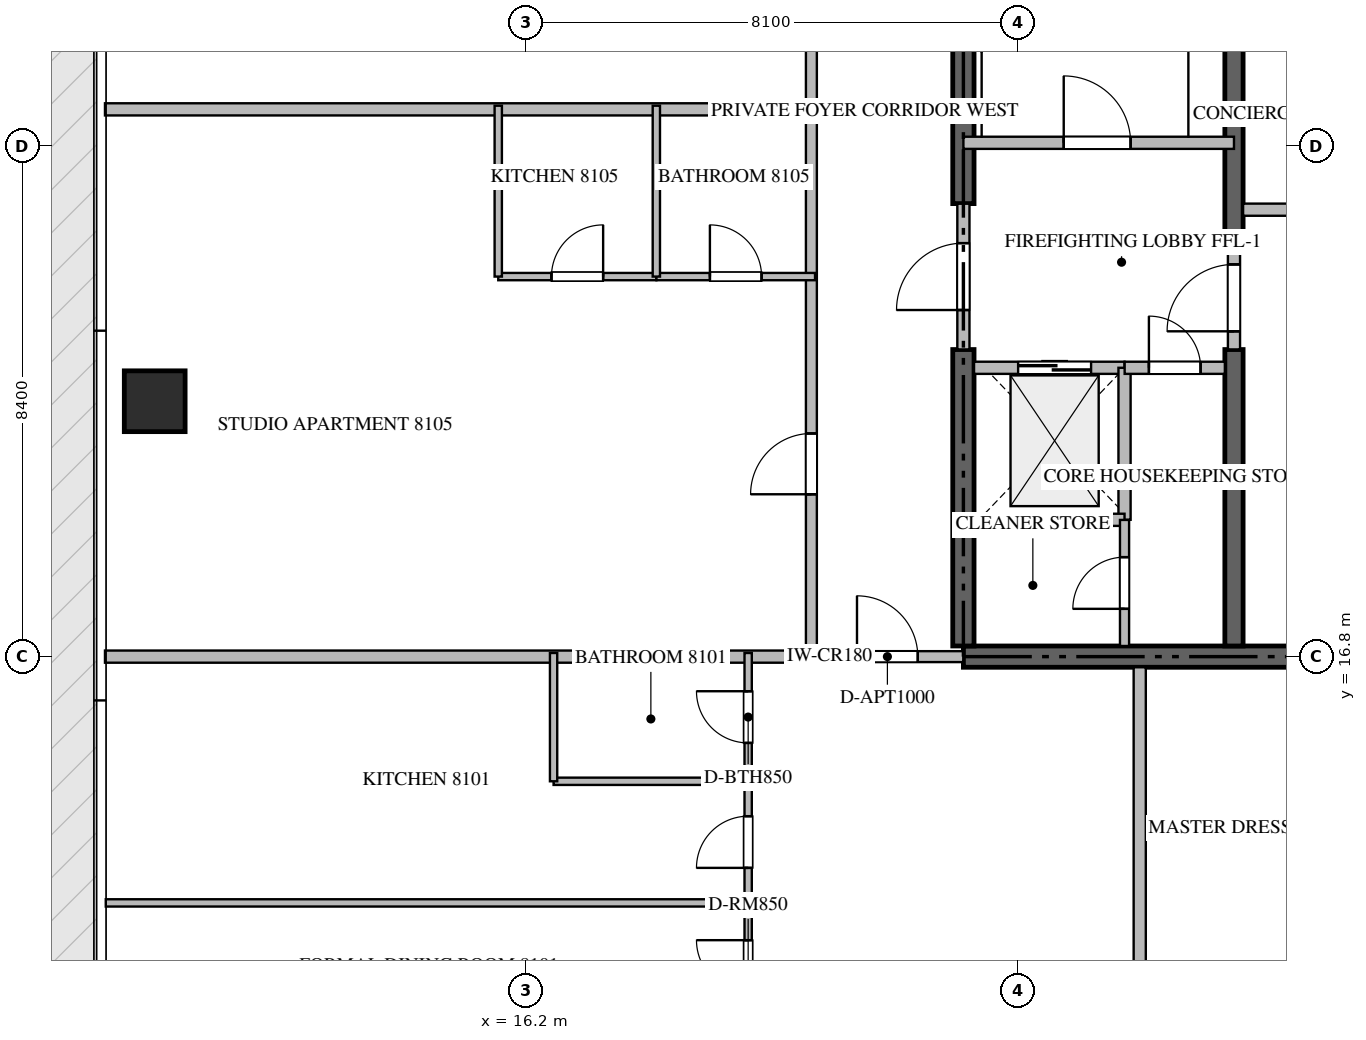
"""IFC4 building model, lengths in metres.
Left out: names, types, materials, properties, quantities, classifications, styles, units other than length and angle.
Written with IfcOpenShell. Run it as: python <this file> out.ifc"""

import sys

from ifc_helpers import new_model, si_unit, direction, frame, frame_2d, origin, origin_2d, place, context, subcontext, project, spatial, rectangle, extrude, source, transform, mapped, element, fill, save


model = new_model("IFC4")
c1 = context("Model", 3, precision=1e-05, world=origin(), true_north=direction((0.0, 1.0)))
c2 = subcontext(c1, "Body", "Model", "MODEL_VIEW")
j1 = project(units=[si_unit("LENGTHUNIT", "METRE"), si_unit("PLANEANGLEUNIT", "RADIAN")], contexts=[c1])
p1 = place(None, origin())
s1 = spatial("IfcSite", under=j1, at=p1, CompositionType="ELEMENT")
p2 = place(p1, origin())
s2 = spatial("IfcBuilding", under=s1, at=p2, CompositionType="ELEMENT")
p3 = place(p2, frame((0.0, 0.0, 325.85)))
s3 = spatial("IfcBuildingStorey", under=s2, at=p3, CompositionType="ELEMENT", Elevation=325.85)
p4 = place(p3, frame((23.4, 16.8, -0.26), z_axis=(0.0, 0.0, 1.0), x_axis=(1.0, 0.0, 0.0)))
e1 = element("IfcWall", 1, at=p4, inside=s3, PredefinedType="SHEAR", context=c2, shape_type="SweptSolid", body=[
    extrude(rectangle(XDim=18.0, YDim=0.35, at=frame_2d((9.0, 0.0))), origin(), (0.0, 0.0, 1.0), 4.048),
])
p5 = place(p3, frame((23.4, 16.975, -0.26), z_axis=(0.0, 0.0, 1.0), x_axis=(0.0, 1.0, 0.0)))
e2 = element("IfcWall", 2, at=p5, inside=s3, PredefinedType="SHEAR", context=c2, shape_type="SweptSolid", body=[
    extrude(rectangle(XDim=4.875, YDim=0.35, at=frame_2d((2.438, 0.0))), origin(), (0.0, 0.0, 1.0), 4.048),
])
p6 = place(p3, frame((23.4, 24.25, -0.26), z_axis=(0.0, 0.0, 1.0), x_axis=(0.0, 1.0, 0.0)))
e3 = element("IfcWall", 3, at=p6, inside=s3, PredefinedType="SHEAR", context=c2, shape_type="SweptSolid", body=[
    extrude(rectangle(XDim=9.175, YDim=0.35, at=frame_2d((4.587, 0.0))), origin(), (0.0, 0.0, 1.0), 4.048),
])
p7 = place(p3, frame((27.85, 16.975, -0.26), z_axis=(0.0, 0.0, 1.0), x_axis=(0.0, 1.0, 0.0)))
e4 = element("IfcWall", 4, at=p7, inside=s3, PredefinedType="SHEAR", context=c2, shape_type="SweptSolid", body=[
    extrude(rectangle(XDim=4.875, YDim=0.3, at=frame_2d((2.438, 0.0))), origin(), (0.0, 0.0, 1.0), 4.048),
])
p8 = place(p3, frame((27.85, 23.55, -0.26), z_axis=(0.0, 0.0, 1.0), x_axis=(0.0, 1.0, 0.0)))
e5 = element("IfcWall", 5, at=p8, inside=s3, PredefinedType="SHEAR", context=c2, shape_type="SweptSolid", body=[
    extrude(rectangle(XDim=9.875, YDim=0.3, at=frame_2d((4.938, 0.0))), origin(), (0.0, 0.0, 1.0), 4.048),
])
m1 = source(origin(), c2, "Body", "SweptSolid", [
    extrude(rectangle(XDim=1.0, YDim=1.0, at=origin_2d()), origin(), (0.0, 0.0, 1.0), 4.05),
])
p9 = place(p3, frame((10.1, 21.0, -0.26), z_axis=(0.0, 0.0, 1.0), x_axis=(1.0, 0.0, 0.0)))
e6 = element("IfcColumn", 6, at=p9, inside=s3, PredefinedType="COLUMN", context=c2, shape_type="MappedRepresentation", body=[
    mapped(m1, transform((0.0, 0.0, 0.0), scale=1.0)),
])
p10 = place(p3, frame((23.4, 25.25, 0.0), z_axis=(0.0, 0.0, 1.0), x_axis=(1.0, 0.0, 0.0)))
e7 = element("IfcWall", 7, at=p10, inside=s3, PredefinedType="STANDARD", context=c2, shape_type="SweptSolid", body=[
    extrude(rectangle(XDim=4.45, YDim=0.2, at=frame_2d((2.225, 0.0))), origin(), (0.0, 0.0, 1.0), 3.79),
])
p11 = place(p10, frame((1.65, 0.0, 0.0)))
e8 = element("IfcOpeningElement", 8, at=p11, cuts=e7, PredefinedType="OPENING", context=c2, shape_type="SweptSolid", body=[
    extrude(rectangle(XDim=1.1, YDim=2.15, at=frame_2d((0.55, 1.075))), frame((0.0, 0.11, 0.0), z_axis=(0.0, -1.0, 0.0), x_axis=(1.0, 0.0, 0.0)), (0.0, 0.0, 1.0), 0.22),
])
p12 = place(p3, frame((23.575, 21.55, 0.0), z_axis=(0.0, 0.0, 1.0), x_axis=(1.0, 0.0, 0.0)))
e9 = element("IfcWall", 9, at=p12, inside=s3, PredefinedType="STANDARD", context=c2, shape_type="SweptSolid", body=[
    extrude(rectangle(XDim=2.475, YDim=0.2, at=frame_2d((1.238, 0.0))), origin(), (0.0, 0.0, 1.0), 3.79),
])
p13 = place(p12, frame((0.725, 0.0, 0.0)))
e10 = element("IfcOpeningElement", 10, at=p13, cuts=e9, PredefinedType="OPENING", context=c2, shape_type="SweptSolid", body=[
    extrude(rectangle(XDim=1.2, YDim=2.2, at=frame_2d((0.6, 1.1))), frame((0.0, 0.11, 0.0), z_axis=(0.0, -1.0, 0.0), x_axis=(1.0, 0.0, 0.0)), (0.0, 0.0, 1.0), 0.22),
])
p14 = place(p3, frame((26.05, 19.05, 0.0), z_axis=(0.0, 0.0, 1.0), x_axis=(0.0, 1.0, 0.0)))
e11 = element("IfcWall", 11, at=p14, inside=s3, PredefinedType="STANDARD", context=c2, shape_type="SweptSolid", body=[
    extrude(rectangle(XDim=2.5, YDim=0.2, at=frame_2d((1.25, 0.0))), origin(), (0.0, 0.0, 1.0), 3.79),
])
p15 = place(p3, frame((23.575, 19.05, 0.0), z_axis=(0.0, 0.0, 1.0), x_axis=(1.0, 0.0, 0.0)))
e12 = element("IfcWall", 12, at=p15, inside=s3, PredefinedType="STANDARD", context=c2, shape_type="SweptSolid", body=[
    extrude(rectangle(XDim=2.475, YDim=0.2, at=frame_2d((1.238, 0.0))), origin(), (0.0, 0.0, 1.0), 3.79),
])
p16 = place(p3, frame((26.052, 21.55, 0.0), z_axis=(0.0, 0.0, 1.0), x_axis=(1.0, 0.0, 0.0)))
e13 = element("IfcWall", 13, at=p16, inside=s3, PredefinedType="STANDARD", context=c2, shape_type="SweptSolid", body=[
    extrude(rectangle(XDim=1.648, YDim=0.2, at=frame_2d((0.824, 0.0))), origin(), (0.0, 0.0, 1.0), 3.79),
])
p17 = place(p16, frame((0.399, 0.0, 0.0)))
e14 = element("IfcOpeningElement", 14, at=p17, cuts=e13, PredefinedType="OPENING", context=c2, shape_type="SweptSolid", body=[
    extrude(rectangle(XDim=0.85, YDim=2.1, at=frame_2d((0.425, 1.05))), frame((0.0, 0.11, 0.0), z_axis=(0.0, -1.0, 0.0), x_axis=(1.0, 0.0, 0.0)), (0.0, 0.0, 1.0), 0.22),
])
p18 = place(p3, frame((23.4, 21.852, 0.0), z_axis=(0.0, 0.0, 1.0), x_axis=(0.0, 1.0, 0.0)))
e15 = element("IfcWall", 15, at=p18, inside=s3, PredefinedType="STANDARD", context=c2, shape_type="SweptSolid", body=[
    extrude(rectangle(XDim=2.396, YDim=0.2, at=frame_2d((1.198, 0.0))), origin(), (0.0, 0.0, 1.0), 3.79),
])
p19 = place(p18, frame((0.648, 0.0, 0.0)))
e16 = element("IfcOpeningElement", 16, at=p19, cuts=e15, PredefinedType="OPENING", context=c2, shape_type="SweptSolid", body=[
    extrude(rectangle(XDim=1.1, YDim=2.15, at=frame_2d((0.55, 1.075))), frame((0.0, 0.11, 0.0), z_axis=(0.0, -1.0, 0.0), x_axis=(1.0, 0.0, 0.0)), (0.0, 0.0, 1.0), 0.22),
])
p20 = place(p3, frame((27.85, 21.852, 0.0), z_axis=(0.0, 0.0, 1.0), x_axis=(0.0, 1.0, 0.0)))
e17 = element("IfcWall", 17, at=p20, inside=s3, PredefinedType="STANDARD", context=c2, shape_type="SweptSolid", body=[
    extrude(rectangle(XDim=1.696, YDim=0.2, at=frame_2d((0.848, 0.0))), origin(), (0.0, 0.0, 1.0), 3.79),
])
p21 = place(p20, frame((0.298, 0.0, 0.0)))
e18 = element("IfcOpeningElement", 18, at=p21, cuts=e17, PredefinedType="OPENING", context=c2, shape_type="SweptSolid", body=[
    extrude(rectangle(XDim=1.1, YDim=2.15, at=frame_2d((0.55, 1.075))), frame((0.0, 0.11, 0.0), z_axis=(0.0, -1.0, 0.0), x_axis=(1.0, 0.0, 0.0)), (0.0, 0.0, 1.0), 0.22),
])
p22 = place(p3, frame((26.05, 16.975, 0.0), z_axis=(0.0, 0.0, 1.0), x_axis=(0.0, 1.0, 0.0)))
e19 = element("IfcWall", 19, at=p22, inside=s3, PredefinedType="PARTITIONING", context=c2, shape_type="SweptSolid", body=[
    extrude(rectangle(XDim=2.073, YDim=0.15, at=frame_2d((1.037, 0.0))), origin(), (0.0, 0.0, 1.0), 3.79),
])
p23 = place(p22, frame((0.611, 0.0, 0.0)))
e20 = element("IfcOpeningElement", 20, at=p23, cuts=e19, PredefinedType="OPENING", context=c2, shape_type="SweptSolid", body=[
    extrude(rectangle(XDim=0.85, YDim=2.1, at=frame_2d((0.425, 1.05))), frame((0.0, 0.085, 0.0), z_axis=(0.0, -1.0, 0.0), x_axis=(1.0, 0.0, 0.0)), (0.0, 0.0, 1.0), 0.17),
])
p24 = place(p3, frame((28.0, 19.75, 0.0), z_axis=(0.0, 0.0, 1.0), x_axis=(1.0, 0.0, 0.0)))
e21 = element("IfcWall", 21, at=p24, inside=s3, PredefinedType="STANDARD", context=c2, shape_type="SweptSolid", body=[
    extrude(rectangle(XDim=8.8, YDim=0.2, at=frame_2d((4.4, 0.0))), origin(), (0.0, 0.0, 1.0), 3.79),
])
p25 = place(p24, frame((3.95, 0.0, 0.0)))
e22 = element("IfcOpeningElement", 22, at=p25, cuts=e21, PredefinedType="OPENING", context=c2, shape_type="SweptSolid", body=[
    extrude(rectangle(XDim=0.9, YDim=2.1, at=frame_2d((0.45, 1.05))), frame((0.0, 0.11, 0.0), z_axis=(0.0, -1.0, 0.0), x_axis=(1.0, 0.0, 0.0)), (0.0, 0.0, 1.0), 0.22),
])
p26 = place(p3, frame((28.0, 24.15, 0.0), z_axis=(0.0, 0.0, 1.0), x_axis=(1.0, 0.0, 0.0)))
e23 = element("IfcWall", 23, at=p26, inside=s3, PredefinedType="STANDARD", context=c2, shape_type="SweptSolid", body=[
    extrude(rectangle(XDim=3.45, YDim=0.2, at=frame_2d((1.725, 0.0))), origin(), (0.0, 0.0, 1.0), 3.79),
])
p27 = place(p26, frame((1.3, 0.0, 0.0)))
e24 = element("IfcOpeningElement", 24, at=p27, cuts=e23, PredefinedType="OPENING", context=c2, shape_type="SweptSolid", body=[
    extrude(rectangle(XDim=0.85, YDim=2.1, at=frame_2d((0.425, 1.05))), frame((0.0, 0.11, 0.0), z_axis=(0.0, -1.0, 0.0), x_axis=(1.0, 0.0, 0.0)), (0.0, 0.0, 1.0), 0.22),
])
p28 = place(p3, frame((26.3, 2.482, 0.0), z_axis=(0.0, 0.0, 1.0), x_axis=(0.0, 1.0, 0.0)))
e25 = element("IfcWall", 25, at=p28, inside=s3, PredefinedType="PARTITIONING", context=c2, shape_type="SweptSolid", body=[
    extrude(rectangle(XDim=14.143, YDim=0.2, at=frame_2d((7.072, 0.0))), origin(), (0.0, 0.0, 1.0), 3.79),
])
p29 = place(p3, frame((9.282, 25.8, 0.0), z_axis=(0.0, 0.0, 1.0), x_axis=(1.0, 0.0, 0.0)))
e26 = element("IfcWall", 26, at=p29, inside=s3, PredefinedType="PARTITIONING", context=c2, shape_type="SweptSolid", body=[
    extrude(rectangle(XDim=11.738, YDim=0.2, at=frame_2d((5.869, 0.0))), origin(), (0.0, 0.0, 1.0), 3.79),
])
p30 = place(p3, frame((9.282, 16.8, 0.0), z_axis=(0.0, 0.0, 1.0), x_axis=(1.0, 0.0, 0.0)))
e27 = element("IfcWall", 27, at=p30, inside=s3, PredefinedType="PARTITIONING", context=c2, shape_type="SweptSolid", body=[
    extrude(rectangle(XDim=11.618, YDim=0.2, at=frame_2d((5.809, 0.0))), origin(), (0.0, 0.0, 1.0), 3.79),
])
p31 = place(p3, frame((20.902, 16.8, 0.0), z_axis=(0.0, 0.0, 1.0), x_axis=(1.0, 0.0, 0.0)))
e28 = element("IfcWall", 28, at=p31, inside=s3, PredefinedType="PARTITIONING", context=c2, shape_type="SweptSolid", body=[
    extrude(rectangle(XDim=2.496, YDim=0.18, at=frame_2d((1.248, 0.0))), origin(), (0.0, 0.0, 1.0), 3.79),
])
p32 = place(p31, frame((0.748, 0.0, 0.0)))
e29 = element("IfcOpeningElement", 29, at=p32, cuts=e28, PredefinedType="OPENING", context=c2, shape_type="SweptSolid", body=[
    extrude(rectangle(XDim=1.0, YDim=2.15, at=frame_2d((0.5, 1.075))), frame((0.0, 0.1, 0.0), z_axis=(0.0, -1.0, 0.0), x_axis=(1.0, 0.0, 0.0)), (0.0, 0.0, 1.0), 0.2),
])
p33 = place(p3, frame((20.9, 16.8, 0.0), z_axis=(0.0, 0.0, 1.0), x_axis=(0.0, 1.0, 0.0)))
e30 = element("IfcWall", 30, at=p33, inside=s3, PredefinedType="PARTITIONING", context=c2, shape_type="SweptSolid", body=[
    extrude(rectangle(XDim=16.8, YDim=0.18, at=frame_2d((8.4, 0.0))), origin(), (0.0, 0.0, 1.0), 3.79),
])
p34 = place(p33, frame((2.67, 0.0, 0.0)))
e31 = element("IfcOpeningElement", 31, at=p34, cuts=e30, PredefinedType="OPENING", context=c2, shape_type="SweptSolid", body=[
    extrude(rectangle(XDim=1.0, YDim=2.15, at=frame_2d((0.5, 1.075))), frame((0.0, 0.1, 0.0), z_axis=(0.0, -1.0, 0.0), x_axis=(1.0, 0.0, 0.0)), (0.0, 0.0, 1.0), 0.2),
])
p35 = place(p33, frame((11.107, 0.0, 0.0)))
e32 = element("IfcOpeningElement", 32, at=p35, cuts=e30, PredefinedType="OPENING", context=c2, shape_type="SweptSolid", body=[
    extrude(rectangle(XDim=1.0, YDim=2.15, at=frame_2d((0.5, 1.075))), frame((0.0, 0.1, 0.0), z_axis=(0.0, -1.0, 0.0), x_axis=(1.0, 0.0, 0.0)), (0.0, 0.0, 1.0), 0.2),
])
p36 = place(p3, frame((9.295, 12.75, 0.0), z_axis=(0.0, 0.0, 1.0), x_axis=(1.0, 0.0, 0.0)))
e33 = element("IfcWall", 33, at=p36, inside=s3, PredefinedType="PARTITIONING", context=c2, shape_type="SweptSolid", body=[
    extrude(rectangle(XDim=10.565, YDim=0.12, at=frame_2d((5.283, 0.0))), origin(), (0.0, 0.0, 1.0), 3.79),
])
p37 = place(p3, frame((16.66, 14.75, 0.0), z_axis=(0.0, 0.0, 1.0), x_axis=(1.0, 0.0, 0.0)))
e34 = element("IfcWall", 34, at=p37, inside=s3, PredefinedType="PARTITIONING", context=c2, shape_type="SweptSolid", body=[
    extrude(rectangle(XDim=3.2, YDim=0.12, at=frame_2d((1.6, 0.0))), origin(), (0.0, 0.0, 1.0), 3.79),
])
p38 = place(p3, frame((16.66, 14.75, 0.0), z_axis=(0.0, 0.0, 1.0), x_axis=(0.0, 1.0, 0.0)))
e35 = element("IfcWall", 35, at=p38, inside=s3, PredefinedType="PARTITIONING", context=c2, shape_type="SweptSolid", body=[
    extrude(rectangle(XDim=2.11, YDim=0.12, at=frame_2d((1.055, 0.0))), origin(), (0.0, 0.0, 1.0), 3.79),
])
p39 = place(p3, frame((19.86, 10.674, 0.0), z_axis=(0.0, 0.0, 1.0), x_axis=(0.0, 1.0, 0.0)))
e36 = element("IfcWall", 36, at=p39, inside=s3, PredefinedType="PARTITIONING", context=c2, shape_type="SweptSolid", body=[
    extrude(rectangle(XDim=2.076, YDim=0.12, at=frame_2d((1.038, 0.0))), origin(), (0.0, 0.0, 1.0), 3.79),
])
p40 = place(p39, frame((0.613, 0.0, 0.0)))
e37 = element("IfcOpeningElement", 37, at=p40, cuts=e36, PredefinedType="OPENING", context=c2, shape_type="SweptSolid", body=[
    extrude(rectangle(XDim=0.85, YDim=2.1, at=frame_2d((0.425, 1.05))), frame((0.0, 0.07, 0.0), z_axis=(0.0, -1.0, 0.0), x_axis=(1.0, 0.0, 0.0)), (0.0, 0.0, 1.0), 0.14),
])
p41 = place(p3, frame((19.86, 12.752, 0.0), z_axis=(0.0, 0.0, 1.0), x_axis=(0.0, 1.0, 0.0)))
e38 = element("IfcWall", 38, at=p41, inside=s3, PredefinedType="PARTITIONING", context=c2, shape_type="SweptSolid", body=[
    extrude(rectangle(XDim=1.998, YDim=0.12, at=frame_2d((0.999, 0.0))), origin(), (0.0, 0.0, 1.0), 3.79),
])
p42 = place(p41, frame((0.574, 0.0, 0.0)))
e39 = element("IfcOpeningElement", 39, at=p42, cuts=e38, PredefinedType="OPENING", context=c2, shape_type="SweptSolid", body=[
    extrude(rectangle(XDim=0.85, YDim=2.1, at=frame_2d((0.425, 1.05))), frame((0.0, 0.07, 0.0), z_axis=(0.0, -1.0, 0.0), x_axis=(1.0, 0.0, 0.0)), (0.0, 0.0, 1.0), 0.14),
])
p43 = place(p3, frame((19.86, 14.752, 0.0), z_axis=(0.0, 0.0, 1.0), x_axis=(0.0, 1.0, 0.0)))
e40 = element("IfcWall", 40, at=p43, inside=s3, PredefinedType="PARTITIONING", context=c2, shape_type="SweptSolid", body=[
    extrude(rectangle(XDim=2.108, YDim=0.12, at=frame_2d((1.054, 0.0))), origin(), (0.0, 0.0, 1.0), 3.79),
])
p44 = place(p43, frame((0.629, 0.0, 0.0)))
e41 = element("IfcOpeningElement", 41, at=p44, cuts=e40, PredefinedType="OPENING", context=c2, shape_type="SweptSolid", body=[
    extrude(rectangle(XDim=0.85, YDim=2.1, at=frame_2d((0.425, 1.05))), frame((0.0, 0.07, 0.0), z_axis=(0.0, -1.0, 0.0), x_axis=(1.0, 0.0, 0.0)), (0.0, 0.0, 1.0), 0.14),
])
p45 = place(p3, frame((15.75, 23.05, 0.0), z_axis=(0.0, 0.0, 1.0), x_axis=(1.0, 0.0, 0.0)))
e42 = element("IfcWall", 42, at=p45, inside=s3, PredefinedType="PARTITIONING", context=c2, shape_type="SweptSolid", body=[
    extrude(rectangle(XDim=2.6, YDim=0.12, at=frame_2d((1.3, 0.0))), origin(), (0.0, 0.0, 1.0), 3.79),
])
p46 = place(p45, frame((0.875, 0.0, 0.0)))
e43 = element("IfcOpeningElement", 43, at=p46, cuts=e42, PredefinedType="OPENING", context=c2, shape_type="SweptSolid", body=[
    extrude(rectangle(XDim=0.85, YDim=2.1, at=frame_2d((0.425, 1.05))), frame((0.0, 0.07, 0.0), z_axis=(0.0, -1.0, 0.0), x_axis=(1.0, 0.0, 0.0)), (0.0, 0.0, 1.0), 0.14),
])
p47 = place(p3, frame((18.352, 23.05, 0.0), z_axis=(0.0, 0.0, 1.0), x_axis=(1.0, 0.0, 0.0)))
e44 = element("IfcWall", 44, at=p47, inside=s3, PredefinedType="PARTITIONING", context=c2, shape_type="SweptSolid", body=[
    extrude(rectangle(XDim=2.608, YDim=0.12, at=frame_2d((1.304, 0.0))), origin(), (0.0, 0.0, 1.0), 3.79),
])
p48 = place(p47, frame((0.879, 0.0, 0.0)))
e45 = element("IfcOpeningElement", 45, at=p48, cuts=e44, PredefinedType="OPENING", context=c2, shape_type="SweptSolid", body=[
    extrude(rectangle(XDim=0.85, YDim=2.1, at=frame_2d((0.425, 1.05))), frame((0.0, 0.07, 0.0), z_axis=(0.0, -1.0, 0.0), x_axis=(1.0, 0.0, 0.0)), (0.0, 0.0, 1.0), 0.14),
])
for number, where, z_axis, x_axis in (
    (46, (18.35, 23.05, 0.0), (0.0, 0.0, 1.0), (0.0, 1.0, 0.0)),
    (47, (15.75, 23.05, 0.0), (0.0, 0.0, 1.0), (0.0, 1.0, 0.0)),
):
    element("IfcWall", number, at=place(p3, frame(where, z_axis=z_axis, x_axis=x_axis)), inside=s3, PredefinedType="PARTITIONING", context=c2, shape_type="SweptSolid", body=[
        extrude(rectangle(XDim=2.81, YDim=0.12, at=frame_2d((1.405, 0.0))), origin(), (0.0, 0.0, 1.0), 3.79),
    ])
m2 = source(origin(), c2, "Body", "SweptSolid", [
    extrude(rectangle(XDim=1.1, YDim=2.15, at=frame_2d((0.55, 1.075))), frame((0.0, 0.025, 0.0), z_axis=(0.0, -1.0, 0.0), x_axis=(1.0, 0.0, 0.0)), (0.0, 0.0, 1.0), 0.05),
])
p49 = place(p11, origin())
e48 = element("IfcDoor", 48, at=p49, inside=s3, OperationType="SINGLE_SWING_LEFT", PredefinedType="DOOR", context=c2, shape_type="MappedRepresentation", body=[
    mapped(m2, transform((0.0, 0.0, 0.0), scale=1.0)),
])
fill(e8, e48)
m3 = source(origin(), c2, "Body", "SweptSolid", [
    extrude(rectangle(XDim=1.2, YDim=2.2, at=frame_2d((0.6, 1.1))), frame((0.0, 0.025, 0.0), z_axis=(0.0, -1.0, 0.0), x_axis=(1.0, 0.0, 0.0)), (0.0, 0.0, 1.0), 0.05),
])
p50 = place(p13, origin())
e49 = element("IfcDoor", 49, at=p50, inside=s3, OperationType="DOUBLE_DOOR_SLIDING", PredefinedType="DOOR", context=c2, shape_type="MappedRepresentation", body=[
    mapped(m3, transform((0.0, 0.0, 0.0), scale=1.0)),
])
fill(e10, e49)
m4 = source(origin(), c2, "Body", "SweptSolid", [
    extrude(rectangle(XDim=0.85, YDim=2.1, at=frame_2d((0.425, 1.05))), frame((0.0, 0.025, 0.0), z_axis=(0.0, -1.0, 0.0), x_axis=(1.0, 0.0, 0.0)), (0.0, 0.0, 1.0), 0.05),
])
p51 = place(p17, origin())
e50 = element("IfcDoor", 50, at=p51, inside=s3, OperationType="SINGLE_SWING_LEFT", PredefinedType="DOOR", context=c2, shape_type="MappedRepresentation", body=[
    mapped(m4, transform((0.0, 0.0, 0.0), scale=1.0)),
])
fill(e14, e50)
p52 = place(p19, origin())
e51 = element("IfcDoor", 51, at=p52, inside=s3, OperationType="SINGLE_SWING_LEFT", PredefinedType="DOOR", context=c2, shape_type="MappedRepresentation", body=[
    mapped(m2, transform((0.0, 0.0, 0.0), scale=1.0)),
])
fill(e16, e51)
p53 = place(p21, origin())
e52 = element("IfcDoor", 52, at=p53, inside=s3, OperationType="SINGLE_SWING_LEFT", PredefinedType="DOOR", context=c2, shape_type="MappedRepresentation", body=[
    mapped(m2, transform((0.0, 0.0, 0.0), scale=1.0)),
])
fill(e18, e52)
p54 = place(p23, origin())
e53 = element("IfcDoor", 53, at=p54, inside=s3, OperationType="SINGLE_SWING_LEFT", PredefinedType="DOOR", context=c2, shape_type="MappedRepresentation", body=[
    mapped(m4, transform((0.0, 0.0, 0.0), scale=1.0)),
])
fill(e20, e53)
m5 = source(origin(), c2, "Body", "SweptSolid", [
    extrude(rectangle(XDim=1.0, YDim=2.15, at=frame_2d((0.5, 1.075))), frame((0.0, 0.025, 0.0), z_axis=(0.0, -1.0, 0.0), x_axis=(1.0, 0.0, 0.0)), (0.0, 0.0, 1.0), 0.05),
])
p55 = place(p32, origin())
e54 = element("IfcDoor", 54, at=p55, inside=s3, OperationType="SINGLE_SWING_LEFT", PredefinedType="DOOR", context=c2, shape_type="MappedRepresentation", body=[
    mapped(m5, transform((0.0, 0.0, 0.0), scale=1.0)),
])
fill(e29, e54)
p56 = place(p34, origin())
e55 = element("IfcDoor", 55, at=p56, inside=s3, OperationType="SINGLE_SWING_LEFT", PredefinedType="DOOR", context=c2, shape_type="MappedRepresentation", body=[
    mapped(m5, transform((0.0, 0.0, 0.0), scale=1.0)),
])
fill(e31, e55)
p57 = place(p40, origin())
e56 = element("IfcDoor", 56, at=p57, inside=s3, OperationType="SINGLE_SWING_RIGHT", PredefinedType="DOOR", context=c2, shape_type="MappedRepresentation", body=[
    mapped(m4, transform((0.0, 0.0, 0.0), scale=1.0)),
])
fill(e37, e56)
p58 = place(p42, origin())
e57 = element("IfcDoor", 57, at=p58, inside=s3, OperationType="SINGLE_SWING_LEFT", PredefinedType="DOOR", context=c2, shape_type="MappedRepresentation", body=[
    mapped(m4, transform((0.0, 0.0, 0.0), scale=1.0)),
])
fill(e39, e57)
p59 = place(p44, origin())
e58 = element("IfcDoor", 58, at=p59, inside=s3, OperationType="SINGLE_SWING_RIGHT", PredefinedType="DOOR", context=c2, shape_type="MappedRepresentation", body=[
    mapped(m4, transform((0.0, 0.0, 0.0), scale=1.0)),
])
fill(e41, e58)
p60 = place(p46, origin())
e59 = element("IfcDoor", 59, at=p60, inside=s3, OperationType="SINGLE_SWING_RIGHT", PredefinedType="DOOR", context=c2, shape_type="MappedRepresentation", body=[
    mapped(m4, transform((0.0, 0.0, 0.0), scale=1.0)),
])
fill(e43, e59)
p61 = place(p48, origin())
e60 = element("IfcDoor", 60, at=p61, inside=s3, OperationType="SINGLE_SWING_LEFT", PredefinedType="DOOR", context=c2, shape_type="MappedRepresentation", body=[
    mapped(m4, transform((0.0, 0.0, 0.0), scale=1.0)),
])
fill(e45, e60)
save(model, sys.argv[1])
